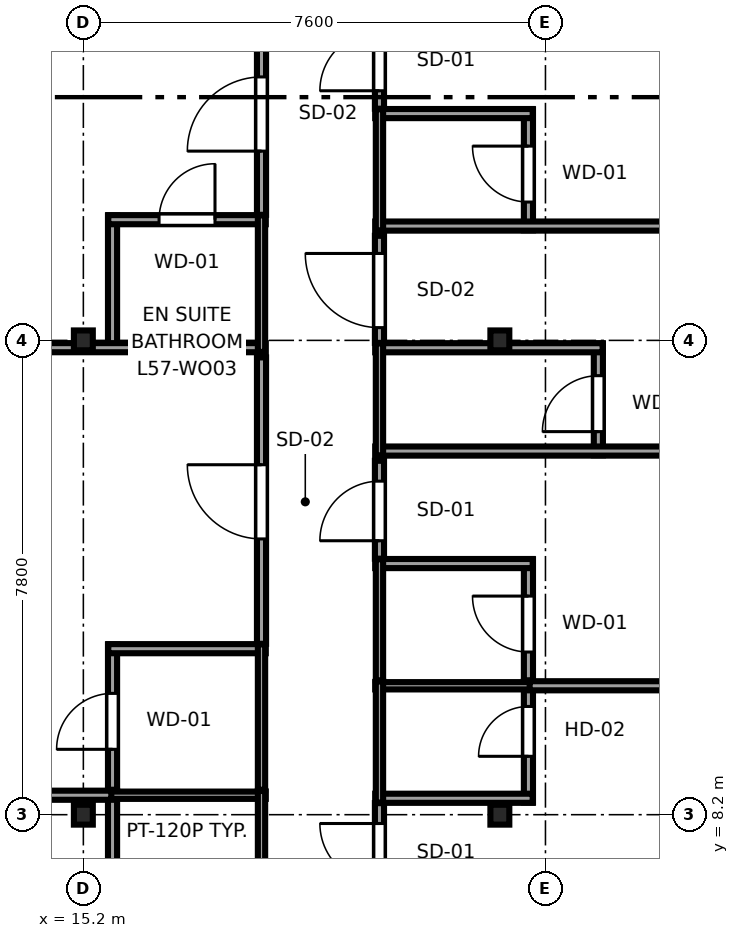
"""IFC4 building model, lengths in metres.
Left out: names, types, materials, properties, quantities, classifications, styles, units other than length and angle.
Written with IfcOpenShell. Run it as: python <this file> out.ifc"""

import sys

from ifc_helpers import new_model, si_unit, direction, frame, frame_2d, origin, origin_2d, place, context, subcontext, project, spatial, rectangle, i_section, extrude, source, transform, mapped, element, fill, save


model = new_model("IFC4")
c1 = context("Model", 3, precision=1e-05, world=origin(), true_north=direction((0.0, 1.0)))
c2 = subcontext(c1, "Body", "Model", "MODEL_VIEW")
j1 = project(units=[si_unit("LENGTHUNIT", "METRE"), si_unit("PLANEANGLEUNIT", "RADIAN")], contexts=[c1])
p1 = place(None, origin())
s1 = spatial("IfcSite", under=j1, at=p1, CompositionType="ELEMENT")
p2 = place(p1, origin())
s2 = spatial("IfcBuilding", under=s1, at=p2, CompositionType="ELEMENT")
p3 = place(p2, frame((0.0, 0.0, 216.8)))
s3 = spatial("IfcBuildingStorey", under=s2, at=p3, CompositionType="ELEMENT", Elevation=216.8)
m1 = source(origin(), c2, "Body", "SweptSolid", [
    extrude(i_section(OverallWidth=0.311, OverallDepth=0.327, WebThickness=0.016, FlangeThickness=0.025, FilletRadius=0.017, at=origin_2d()), origin(), (0.0, 0.0, 1.0), 3.55),
])
for number, where, z_axis, x_axis in (
    (1, (15.2, 8.2, 0.0), (0.0, 0.0, 1.0), (1.0, 0.0, 0.0)),
    (2, (15.2, 16.0, 0.0), (0.0, 0.0, 1.0), (1.0, 0.0, 0.0)),
    (3, (22.05, 8.2, 0.0), (0.0, 0.0, 1.0), (1.0, 0.0, 0.0)),
    (4, (22.05, 16.0, 0.0), (0.0, 0.0, 1.0), (1.0, 0.0, 0.0)),
):
    element("IfcColumn", number, at=place(p3, frame(where, z_axis=z_axis, x_axis=x_axis)), inside=s3, PredefinedType="COLUMN", context=c2, shape_type="MappedRepresentation", body=[
        mapped(m1, transform((0.0, 0.0, 0.0), x_axis=(1.0, 0.0, 0.0), y_axis=(0.0, 1.0, 0.0), z_axis=(0.0, 0.0, 1.0), scale=1.0)),
    ])
p4 = place(p3, frame((15.68, 6.383, 0.0), z_axis=(0.0, 0.0, 1.0), x_axis=(0.0, 1.0, 0.0)))
e5 = element("IfcWall", 5, at=p4, inside=s3, PredefinedType="PARTITIONING", context=c2, shape_type="SweptSolid", body=[
    extrude(rectangle(XDim=2.207, YDim=0.15, at=frame_2d((1.104, 0.0))), origin(), (0.0, 0.0, 1.0), 3.37),
])
p5 = place(p3, frame((15.61, 8.52, 0.0), z_axis=(0.0, 0.0, 1.0), x_axis=(1.0, 0.0, 0.0)))
e6 = element("IfcWall", 6, at=p5, inside=s3, PredefinedType="PLUMBINGWALL", context=c2, shape_type="SweptSolid", body=[
    extrude(rectangle(XDim=2.59, YDim=0.12, at=frame_2d((1.295, 0.0))), origin(), (0.0, 0.0, 1.0), 3.37),
])
p6 = place(p3, frame((18.13, 6.383, 0.0), z_axis=(0.0, 0.0, 1.0), x_axis=(0.0, 1.0, 0.0)))
e7 = element("IfcWall", 7, at=p6, inside=s3, PredefinedType="PLUMBINGWALL", context=c2, shape_type="SweptSolid", body=[
    extrude(rectangle(XDim=2.207, YDim=0.12, at=frame_2d((1.104, 0.0))), origin(), (0.0, 0.0, 1.0), 3.37),
])
p7 = place(p3, frame((15.68, 8.61, 0.0), z_axis=(0.0, 0.0, 1.0), x_axis=(0.0, 1.0, 0.0)))
e8 = element("IfcWall", 8, at=p7, inside=s3, PredefinedType="PARTITIONING", context=c2, shape_type="SweptSolid", body=[
    extrude(rectangle(XDim=2.39, YDim=0.15, at=frame_2d((1.195, 0.0))), origin(), (0.0, 0.0, 1.0), 3.37),
])
p8 = place(p7, frame((0.665, 0.0, 0.0)))
e9 = element("IfcOpeningElement", 9, at=p8, cuts=e8, PredefinedType="OPENING", context=c2, shape_type="SweptSolid", body=[
    extrude(rectangle(XDim=0.92, YDim=2.01, at=frame_2d((0.46, 1.005))), frame((0.0, 0.085, 0.0), z_axis=(0.0, -1.0, 0.0), x_axis=(1.0, 0.0, 0.0)), (0.0, 0.0, 1.0), 0.17),
])
p9 = place(p3, frame((15.61, 10.93, 0.0), z_axis=(0.0, 0.0, 1.0), x_axis=(1.0, 0.0, 0.0)))
e10 = element("IfcWall", 10, at=p9, inside=s3, PredefinedType="PARTITIONING", context=c2, shape_type="SweptSolid", body=[
    extrude(rectangle(XDim=2.59, YDim=0.15, at=frame_2d((1.295, 0.0))), origin(), (0.0, 0.0, 1.0), 3.37),
])
p10 = place(p3, frame((18.13, 8.61, 0.0), z_axis=(0.0, 0.0, 1.0), x_axis=(0.0, 1.0, 0.0)))
e11 = element("IfcWall", 11, at=p10, inside=s3, PredefinedType="PLUMBINGWALL", context=c2, shape_type="SweptSolid", body=[
    extrude(rectangle(XDim=2.39, YDim=0.12, at=frame_2d((1.195, 0.0))), origin(), (0.0, 0.0, 1.0), 3.37),
])
p11 = place(p3, frame((15.68, 15.81, 0.0), z_axis=(0.0, 0.0, 1.0), x_axis=(0.0, 1.0, 0.0)))
e12 = element("IfcWall", 12, at=p11, inside=s3, PredefinedType="PARTITIONING", context=c2, shape_type="SweptSolid", body=[
    extrude(rectangle(XDim=2.245, YDim=0.15, at=frame_2d((1.123, 0.0))), origin(), (0.0, 0.0, 1.0), 3.37),
])
p12 = place(p3, frame((3.005, 15.88, 0.0), z_axis=(0.0, 0.0, 1.0), x_axis=(1.0, 0.0, 0.0)))
e13 = element("IfcWall", 13, at=p12, inside=s3, PredefinedType="PARTITIONING", context=c2, shape_type="SweptSolid", body=[
    extrude(rectangle(XDim=15.195, YDim=0.15, at=frame_2d((7.598, 0.0))), origin(), (0.0, 0.0, 1.0), 2.758),
])
p13 = place(p3, frame((15.61, 17.985, 0.0), z_axis=(0.0, 0.0, 1.0), x_axis=(1.0, 0.0, 0.0)))
e14 = element("IfcWall", 14, at=p13, inside=s3, PredefinedType="PARTITIONING", context=c2, shape_type="SweptSolid", body=[
    extrude(rectangle(XDim=2.59, YDim=0.15, at=frame_2d((1.295, 0.0))), origin(), (0.0, 0.0, 1.0), 3.37),
])
p14 = place(p13, frame((0.835, 0.0, 0.0)))
e15 = element("IfcOpeningElement", 15, at=p14, cuts=e14, PredefinedType="OPENING", context=c2, shape_type="SweptSolid", body=[
    extrude(rectangle(XDim=0.92, YDim=2.01, at=frame_2d((0.46, 1.005))), frame((0.0, 0.085, 0.0), z_axis=(0.0, -1.0, 0.0), x_axis=(1.0, 0.0, 0.0)), (0.0, 0.0, 1.0), 0.17),
])
p15 = place(p3, frame((18.13, 15.81, 0.0), z_axis=(0.0, 0.0, 1.0), x_axis=(0.0, 1.0, 0.0)))
e16 = element("IfcWall", 16, at=p15, inside=s3, PredefinedType="PLUMBINGWALL", context=c2, shape_type="SweptSolid", body=[
    extrude(rectangle(XDim=2.245, YDim=0.12, at=frame_2d((1.123, 0.0))), origin(), (0.0, 0.0, 1.0), 3.37),
])
p16 = place(p3, frame((22.52, 8.4, 0.0), z_axis=(0.0, 0.0, 1.0), x_axis=(0.0, 1.0, 0.0)))
e17 = element("IfcWall", 17, at=p16, inside=s3, PredefinedType="PARTITIONING", context=c2, shape_type="SweptSolid", body=[
    extrude(rectangle(XDim=1.99, YDim=0.15, at=frame_2d((0.995, 0.0))), origin(), (0.0, 0.0, 1.0), 3.37),
])
p17 = place(p16, frame((0.76, 0.0, 0.0)))
e18 = element("IfcOpeningElement", 18, at=p17, cuts=e17, PredefinedType="OPENING", context=c2, shape_type="SweptSolid", body=[
    extrude(rectangle(XDim=0.82, YDim=2.01, at=frame_2d((0.41, 1.005))), frame((0.0, 0.085, 0.0), z_axis=(0.0, -1.0, 0.0), x_axis=(1.0, 0.0, 0.0)), (0.0, 0.0, 1.0), 0.17),
])
p18 = place(p3, frame((20.0, 8.47, 0.0), z_axis=(0.0, 0.0, 1.0), x_axis=(1.0, 0.0, 0.0)))
e19 = element("IfcWall", 19, at=p18, inside=s3, PredefinedType="PARTITIONING", context=c2, shape_type="SweptSolid", body=[
    extrude(rectangle(XDim=2.59, YDim=0.15, at=frame_2d((1.295, 0.0))), origin(), (0.0, 0.0, 1.0), 3.37),
])
p19 = place(p3, frame((20.0, 10.32, 0.0), z_axis=(0.0, 0.0, 1.0), x_axis=(1.0, 0.0, 0.0)))
e20 = element("IfcWall", 20, at=p19, inside=s3, PredefinedType="PLUMBINGWALL", context=c2, shape_type="SweptSolid", body=[
    extrude(rectangle(XDim=2.59, YDim=0.12, at=frame_2d((1.295, 0.0))), origin(), (0.0, 0.0, 1.0), 3.37),
])
p20 = place(p3, frame((20.07, 8.4, 0.0), z_axis=(0.0, 0.0, 1.0), x_axis=(0.0, 1.0, 0.0)))
e21 = element("IfcWall", 21, at=p20, inside=s3, PredefinedType="PLUMBINGWALL", context=c2, shape_type="SweptSolid", body=[
    extrude(rectangle(XDim=1.99, YDim=0.12, at=frame_2d((0.995, 0.0))), origin(), (0.0, 0.0, 1.0), 3.37),
])
p21 = place(p3, frame((22.52, 10.41, 0.0), z_axis=(0.0, 0.0, 1.0), x_axis=(0.0, 1.0, 0.0)))
e22 = element("IfcWall", 22, at=p21, inside=s3, PredefinedType="PARTITIONING", context=c2, shape_type="SweptSolid", body=[
    extrude(rectangle(XDim=1.99, YDim=0.15, at=frame_2d((0.995, 0.0))), origin(), (0.0, 0.0, 1.0), 3.37),
])
p22 = place(p21, frame((0.465, 0.0, 0.0)))
e23 = element("IfcOpeningElement", 23, at=p22, cuts=e22, PredefinedType="OPENING", context=c2, shape_type="SweptSolid", body=[
    extrude(rectangle(XDim=0.92, YDim=2.01, at=frame_2d((0.46, 1.005))), frame((0.0, 0.085, 0.0), z_axis=(0.0, -1.0, 0.0), x_axis=(1.0, 0.0, 0.0)), (0.0, 0.0, 1.0), 0.17),
])
p23 = place(p3, frame((20.0, 12.33, 0.0), z_axis=(0.0, 0.0, 1.0), x_axis=(1.0, 0.0, 0.0)))
e24 = element("IfcWall", 24, at=p23, inside=s3, PredefinedType="PARTITIONING", context=c2, shape_type="SweptSolid", body=[
    extrude(rectangle(XDim=2.59, YDim=0.15, at=frame_2d((1.295, 0.0))), origin(), (0.0, 0.0, 1.0), 3.37),
])
p24 = place(p3, frame((20.07, 10.41, 0.0), z_axis=(0.0, 0.0, 1.0), x_axis=(0.0, 1.0, 0.0)))
e25 = element("IfcWall", 25, at=p24, inside=s3, PredefinedType="PLUMBINGWALL", context=c2, shape_type="SweptSolid", body=[
    extrude(rectangle(XDim=1.99, YDim=0.12, at=frame_2d((0.995, 0.0))), origin(), (0.0, 0.0, 1.0), 3.37),
])
p25 = place(p3, frame((23.67, 14.11, 0.0), z_axis=(0.0, 0.0, 1.0), x_axis=(0.0, 1.0, 0.0)))
e26 = element("IfcWall", 26, at=p25, inside=s3, PredefinedType="PARTITIONING", context=c2, shape_type="SweptSolid", body=[
    extrude(rectangle(XDim=1.839, YDim=0.15, at=frame_2d((0.919, 0.0))), origin(), (0.0, 0.0, 1.0), 3.37),
])
p26 = place(p25, frame((0.389, 0.0, 0.0)))
e27 = element("IfcOpeningElement", 27, at=p26, cuts=e26, PredefinedType="OPENING", context=c2, shape_type="SweptSolid", body=[
    extrude(rectangle(XDim=0.92, YDim=2.01, at=frame_2d((0.46, 1.005))), frame((0.0, 0.085, 0.0), z_axis=(0.0, -1.0, 0.0), x_axis=(1.0, 0.0, 0.0)), (0.0, 0.0, 1.0), 0.17),
])
p27 = place(p3, frame((20.0, 14.18, 0.0), z_axis=(0.0, 0.0, 1.0), x_axis=(1.0, 0.0, 0.0)))
e28 = element("IfcWall", 28, at=p27, inside=s3, PredefinedType="PARTITIONING", context=c2, shape_type="SweptSolid", body=[
    extrude(rectangle(XDim=19.395, YDim=0.15, at=frame_2d((9.698, 0.0))), origin(), (0.0, 0.0, 1.0), 3.37),
])
p28 = place(p3, frame((20.0, 15.879, 0.0), z_axis=(0.0, 0.0, 1.0), x_axis=(1.0, 0.0, 0.0)))
e29 = element("IfcWall", 29, at=p28, inside=s3, PredefinedType="PARTITIONING", context=c2, shape_type="SweptSolid", body=[
    extrude(rectangle(XDim=3.74, YDim=0.15, at=frame_2d((1.87, 0.0))), origin(), (0.0, 0.0, 1.0), 2.758),
])
p29 = place(p3, frame((20.07, 14.11, 0.0), z_axis=(0.0, 0.0, 1.0), x_axis=(0.0, 1.0, 0.0)))
e30 = element("IfcWall", 30, at=p29, inside=s3, PredefinedType="PLUMBINGWALL", context=c2, shape_type="SweptSolid", body=[
    extrude(rectangle(XDim=1.839, YDim=0.12, at=frame_2d((0.919, 0.0))), origin(), (0.0, 0.0, 1.0), 3.37),
])
p30 = place(p3, frame((22.52, 17.81, 0.0), z_axis=(0.0, 0.0, 1.0), x_axis=(0.0, 1.0, 0.0)))
e31 = element("IfcWall", 31, at=p30, inside=s3, PredefinedType="PARTITIONING", context=c2, shape_type="SweptSolid", body=[
    extrude(rectangle(XDim=1.99, YDim=0.15, at=frame_2d((0.995, 0.0))), origin(), (0.0, 0.0, 1.0), 3.37),
])
p31 = place(p30, frame((0.465, 0.0, 0.0)))
e32 = element("IfcOpeningElement", 32, at=p31, cuts=e31, PredefinedType="OPENING", context=c2, shape_type="SweptSolid", body=[
    extrude(rectangle(XDim=0.92, YDim=2.01, at=frame_2d((0.46, 1.005))), frame((0.0, 0.085, 0.0), z_axis=(0.0, -1.0, 0.0), x_axis=(1.0, 0.0, 0.0)), (0.0, 0.0, 1.0), 0.17),
])
p32 = place(p3, frame((20.0, 17.88, 0.0), z_axis=(0.0, 0.0, 1.0), x_axis=(1.0, 0.0, 0.0)))
e33 = element("IfcWall", 33, at=p32, inside=s3, PredefinedType="PARTITIONING", context=c2, shape_type="SweptSolid", body=[
    extrude(rectangle(XDim=19.395, YDim=0.15, at=frame_2d((9.698, 0.0))), origin(), (0.0, 0.0, 1.0), 3.37),
])
p33 = place(p3, frame((20.0, 19.73, 0.0), z_axis=(0.0, 0.0, 1.0), x_axis=(1.0, 0.0, 0.0)))
e34 = element("IfcWall", 34, at=p33, inside=s3, PredefinedType="PARTITIONING", context=c2, shape_type="SweptSolid", body=[
    extrude(rectangle(XDim=2.59, YDim=0.15, at=frame_2d((1.295, 0.0))), origin(), (0.0, 0.0, 1.0), 3.37),
])
p34 = place(p3, frame((20.07, 17.81, 0.0), z_axis=(0.0, 0.0, 1.0), x_axis=(0.0, 1.0, 0.0)))
e35 = element("IfcWall", 35, at=p34, inside=s3, PredefinedType="PLUMBINGWALL", context=c2, shape_type="SweptSolid", body=[
    extrude(rectangle(XDim=1.99, YDim=0.12, at=frame_2d((0.995, 0.0))), origin(), (0.0, 0.0, 1.0), 3.37),
])
p35 = place(p3, frame((3.005, 8.52, 0.0), z_axis=(0.0, 0.0, 1.0), x_axis=(1.0, 0.0, 0.0)))
e36 = element("IfcWall", 36, at=p35, inside=s3, PredefinedType="PARTITIONING", context=c2, shape_type="SweptSolid", body=[
    extrude(rectangle(XDim=12.655, YDim=0.15, at=frame_2d((6.328, 0.0))), origin(), (0.0, 0.0, 1.0), 3.37),
])
p36 = place(p3, frame((18.13, 11.01, 0.0), z_axis=(0.0, 0.0, 1.0), x_axis=(0.0, 1.0, 0.0)))
e37 = element("IfcWall", 37, at=p36, inside=s3, PredefinedType="PARTITIONING", context=c2, shape_type="SweptSolid", body=[
    extrude(rectangle(XDim=4.71, YDim=0.15, at=frame_2d((2.355, 0.0))), origin(), (0.0, 0.0, 1.0), 3.37),
])
p37 = place(p36, frame((1.725, 0.0, 0.0)))
e38 = element("IfcOpeningElement", 38, at=p37, cuts=e37, PredefinedType="OPENING", context=c2, shape_type="SweptSolid", body=[
    extrude(rectangle(XDim=1.22, YDim=2.08, at=frame_2d((0.61, 1.04))), frame((0.0, 0.085, 0.0), z_axis=(0.0, -1.0, 0.0), x_axis=(1.0, 0.0, 0.0)), (0.0, 0.0, 1.0), 0.17),
])
p38 = place(p3, frame((18.13, 18.065, 0.0), z_axis=(0.0, 0.0, 1.0), x_axis=(0.0, 1.0, 0.0)))
e39 = element("IfcWall", 39, at=p38, inside=s3, PredefinedType="PARTITIONING", context=c2, shape_type="SweptSolid", body=[
    extrude(rectangle(XDim=3.355, YDim=0.15, at=frame_2d((1.677, 0.0))), origin(), (0.0, 0.0, 1.0), 3.37),
])
p39 = place(p38, frame((1.048, 0.0, 0.0)))
e40 = element("IfcOpeningElement", 40, at=p39, cuts=e39, PredefinedType="OPENING", context=c2, shape_type="SweptSolid", body=[
    extrude(rectangle(XDim=1.22, YDim=2.08, at=frame_2d((0.61, 1.04))), frame((0.0, 0.085, 0.0), z_axis=(0.0, -1.0, 0.0), x_axis=(1.0, 0.0, 0.0)), (0.0, 0.0, 1.0), 0.17),
])
p40 = place(p3, frame((20.07, 6.78, 0.0), z_axis=(0.0, 0.0, 1.0), x_axis=(0.0, 1.0, 0.0)))
e41 = element("IfcWall", 41, at=p40, inside=s3, PredefinedType="PARTITIONING", context=c2, shape_type="SweptSolid", body=[
    extrude(rectangle(XDim=1.61, YDim=0.15, at=frame_2d((0.805, 0.0))), origin(), (0.0, 0.0, 1.0), 3.37),
])
p41 = place(p40, frame((0.295, 0.0, 0.0)))
e42 = element("IfcOpeningElement", 42, at=p41, cuts=e41, PredefinedType="OPENING", context=c2, shape_type="SweptSolid", body=[
    extrude(rectangle(XDim=0.98, YDim=2.12, at=frame_2d((0.49, 1.06))), frame((0.0, 0.085, 0.0), z_axis=(0.0, -1.0, 0.0), x_axis=(1.0, 0.0, 0.0)), (0.0, 0.0, 1.0), 0.17),
])
p42 = place(p3, frame((22.54, 10.32, 0.0), z_axis=(0.0, 0.0, 1.0), x_axis=(1.0, 0.0, 0.0)))
e43 = element("IfcWall", 43, at=p42, inside=s3, PredefinedType="PARTITIONING", context=c2, shape_type="SweptSolid", body=[
    extrude(rectangle(XDim=16.855, YDim=0.15, at=frame_2d((8.427, 0.0))), origin(), (0.0, 0.0, 1.0), 3.37),
])
p43 = place(p3, frame((20.07, 12.41, 0.0), z_axis=(0.0, 0.0, 1.0), x_axis=(0.0, 1.0, 0.0)))
e44 = element("IfcWall", 44, at=p43, inside=s3, PredefinedType="PARTITIONING", context=c2, shape_type="SweptSolid", body=[
    extrude(rectangle(XDim=1.61, YDim=0.15, at=frame_2d((0.805, 0.0))), origin(), (0.0, 0.0, 1.0), 3.37),
])
p44 = place(p43, frame((0.295, 0.0, 0.0)))
e45 = element("IfcOpeningElement", 45, at=p44, cuts=e44, PredefinedType="OPENING", context=c2, shape_type="SweptSolid", body=[
    extrude(rectangle(XDim=0.98, YDim=2.12, at=frame_2d((0.49, 1.06))), frame((0.0, 0.085, 0.0), z_axis=(0.0, -1.0, 0.0), x_axis=(1.0, 0.0, 0.0)), (0.0, 0.0, 1.0), 0.17),
])
p45 = place(p3, frame((20.07, 15.959, 0.0), z_axis=(0.0, 0.0, 1.0), x_axis=(0.0, 1.0, 0.0)))
e46 = element("IfcWall", 46, at=p45, inside=s3, PredefinedType="PARTITIONING", context=c2, shape_type="SweptSolid", body=[
    extrude(rectangle(XDim=1.761, YDim=0.15, at=frame_2d((0.88, 0.0))), origin(), (0.0, 0.0, 1.0), 3.37),
])
p46 = place(p45, frame((0.25, 0.0, 0.0)))
e47 = element("IfcOpeningElement", 47, at=p46, cuts=e46, PredefinedType="OPENING", context=c2, shape_type="SweptSolid", body=[
    extrude(rectangle(XDim=1.22, YDim=2.08, at=frame_2d((0.61, 1.04))), frame((0.0, 0.085, 0.0), z_axis=(0.0, -1.0, 0.0), x_axis=(1.0, 0.0, 0.0)), (0.0, 0.0, 1.0), 0.17),
])
p47 = place(p3, frame((20.07, 19.81, 0.0), z_axis=(0.0, 0.0, 1.0), x_axis=(0.0, 1.0, 0.0)))
e48 = element("IfcWall", 48, at=p47, inside=s3, PredefinedType="PARTITIONING", context=c2, shape_type="SweptSolid", body=[
    extrude(rectangle(XDim=1.61, YDim=0.15, at=frame_2d((0.805, 0.0))), origin(), (0.0, 0.0, 1.0), 3.37),
])
p48 = place(p47, frame((0.295, 0.0, 0.0)))
e49 = element("IfcOpeningElement", 49, at=p48, cuts=e48, PredefinedType="OPENING", context=c2, shape_type="SweptSolid", body=[
    extrude(rectangle(XDim=0.98, YDim=2.12, at=frame_2d((0.49, 1.06))), frame((0.0, 0.085, 0.0), z_axis=(0.0, -1.0, 0.0), x_axis=(1.0, 0.0, 0.0)), (0.0, 0.0, 1.0), 0.17),
])
m2 = source(origin(), c2, "Body", "SweptSolid", [
    extrude(rectangle(XDim=0.92, YDim=2.01, at=frame_2d((0.46, 1.005))), frame((0.0, 0.025, 0.0), z_axis=(0.0, -1.0, 0.0), x_axis=(1.0, 0.0, 0.0)), (0.0, 0.0, 1.0), 0.05),
])
p49 = place(p8, origin())
e50 = element("IfcDoor", 50, at=p49, inside=s3, OperationType="SINGLE_SWING_LEFT", PredefinedType="DOOR", context=c2, shape_type="MappedRepresentation", body=[
    mapped(m2, transform((0.0, 0.0, 0.0), x_axis=(1.0, 0.0, 0.0), y_axis=(0.0, 1.0, 0.0), z_axis=(0.0, 0.0, 1.0), scale=1.0)),
])
fill(e9, e50)
p50 = place(p14, origin())
e51 = element("IfcDoor", 51, at=p50, inside=s3, OperationType="SINGLE_SWING_RIGHT", PredefinedType="DOOR", context=c2, shape_type="MappedRepresentation", body=[
    mapped(m2, transform((0.0, 0.0, 0.0), x_axis=(1.0, 0.0, 0.0), y_axis=(0.0, 1.0, 0.0), z_axis=(0.0, 0.0, 1.0), scale=1.0)),
])
fill(e15, e51)
m3 = source(origin(), c2, "Body", "SweptSolid", [
    extrude(rectangle(XDim=0.82, YDim=2.01, at=frame_2d((0.41, 1.005))), frame((0.0, 0.025, 0.0), z_axis=(0.0, -1.0, 0.0), x_axis=(1.0, 0.0, 0.0)), (0.0, 0.0, 1.0), 0.05),
])
p51 = place(p17, origin())
e52 = element("IfcDoor", 52, at=p51, inside=s3, OperationType="SINGLE_SWING_LEFT", PredefinedType="DOOR", context=c2, shape_type="MappedRepresentation", body=[
    mapped(m3, transform((0.0, 0.0, 0.0), x_axis=(1.0, 0.0, 0.0), y_axis=(0.0, 1.0, 0.0), z_axis=(0.0, 0.0, 1.0), scale=1.0)),
])
fill(e18, e52)
p52 = place(p22, origin())
e53 = element("IfcDoor", 53, at=p52, inside=s3, OperationType="SINGLE_SWING_RIGHT", PredefinedType="DOOR", context=c2, shape_type="MappedRepresentation", body=[
    mapped(m2, transform((0.0, 0.0, 0.0), x_axis=(1.0, 0.0, 0.0), y_axis=(0.0, 1.0, 0.0), z_axis=(0.0, 0.0, 1.0), scale=1.0)),
])
fill(e23, e53)
p53 = place(p26, origin())
e54 = element("IfcDoor", 54, at=p53, inside=s3, OperationType="SINGLE_SWING_LEFT", PredefinedType="DOOR", context=c2, shape_type="MappedRepresentation", body=[
    mapped(m2, transform((0.0, 0.0, 0.0), x_axis=(1.0, 0.0, 0.0), y_axis=(0.0, 1.0, 0.0), z_axis=(0.0, 0.0, 1.0), scale=1.0)),
])
fill(e27, e54)
p54 = place(p31, origin())
e55 = element("IfcDoor", 55, at=p54, inside=s3, OperationType="SINGLE_SWING_RIGHT", PredefinedType="DOOR", context=c2, shape_type="MappedRepresentation", body=[
    mapped(m2, transform((0.0, 0.0, 0.0), x_axis=(1.0, 0.0, 0.0), y_axis=(0.0, 1.0, 0.0), z_axis=(0.0, 0.0, 1.0), scale=1.0)),
])
fill(e32, e55)
m4 = source(origin(), c2, "Body", "SweptSolid", [
    extrude(rectangle(XDim=1.22, YDim=2.08, at=frame_2d((0.61, 1.04))), frame((0.0, 0.025, 0.0), z_axis=(0.0, -1.0, 0.0), x_axis=(1.0, 0.0, 0.0)), (0.0, 0.0, 1.0), 0.05),
])
p55 = place(p37, origin())
e56 = element("IfcDoor", 56, at=p55, inside=s3, OperationType="SINGLE_SWING_RIGHT", PredefinedType="DOOR", context=c2, shape_type="MappedRepresentation", body=[
    mapped(m4, transform((0.0, 0.0, 0.0), x_axis=(1.0, 0.0, 0.0), y_axis=(0.0, 1.0, 0.0), z_axis=(0.0, 0.0, 1.0), scale=1.0)),
])
fill(e38, e56)
p56 = place(p39, origin())
e57 = element("IfcDoor", 57, at=p56, inside=s3, OperationType="SINGLE_SWING_LEFT", PredefinedType="DOOR", context=c2, shape_type="MappedRepresentation", body=[
    mapped(m4, transform((0.0, 0.0, 0.0), x_axis=(1.0, 0.0, 0.0), y_axis=(0.0, 1.0, 0.0), z_axis=(0.0, 0.0, 1.0), scale=1.0)),
])
fill(e40, e57)
m5 = source(origin(), c2, "Body", "SweptSolid", [
    extrude(rectangle(XDim=0.98, YDim=2.12, at=frame_2d((0.49, 1.06))), frame((0.0, 0.025, 0.0), z_axis=(0.0, -1.0, 0.0), x_axis=(1.0, 0.0, 0.0)), (0.0, 0.0, 1.0), 0.05),
])
p57 = place(p41, origin())
e58 = element("IfcDoor", 58, at=p57, inside=s3, OperationType="SINGLE_SWING_RIGHT", PredefinedType="DOOR", context=c2, shape_type="MappedRepresentation", body=[
    mapped(m5, transform((0.0, 0.0, 0.0), x_axis=(1.0, 0.0, 0.0), y_axis=(0.0, 1.0, 0.0), z_axis=(0.0, 0.0, 1.0), scale=1.0)),
])
fill(e42, e58)
p58 = place(p44, origin())
e59 = element("IfcDoor", 59, at=p58, inside=s3, OperationType="SINGLE_SWING_LEFT", PredefinedType="DOOR", context=c2, shape_type="MappedRepresentation", body=[
    mapped(m5, transform((0.0, 0.0, 0.0), x_axis=(1.0, 0.0, 0.0), y_axis=(0.0, 1.0, 0.0), z_axis=(0.0, 0.0, 1.0), scale=1.0)),
])
fill(e45, e59)
p59 = place(p46, origin())
e60 = element("IfcDoor", 60, at=p59, inside=s3, OperationType="SINGLE_SWING_RIGHT", PredefinedType="DOOR", context=c2, shape_type="MappedRepresentation", body=[
    mapped(m4, transform((0.0, 0.0, 0.0), x_axis=(1.0, 0.0, 0.0), y_axis=(0.0, 1.0, 0.0), z_axis=(0.0, 0.0, 1.0), scale=1.0)),
])
fill(e47, e60)
p60 = place(p48, origin())
e61 = element("IfcDoor", 61, at=p60, inside=s3, OperationType="SINGLE_SWING_LEFT", PredefinedType="DOOR", context=c2, shape_type="MappedRepresentation", body=[
    mapped(m5, transform((0.0, 0.0, 0.0), x_axis=(1.0, 0.0, 0.0), y_axis=(0.0, 1.0, 0.0), z_axis=(0.0, 0.0, 1.0), scale=1.0)),
])
fill(e49, e61)
save(model, sys.argv[1])
